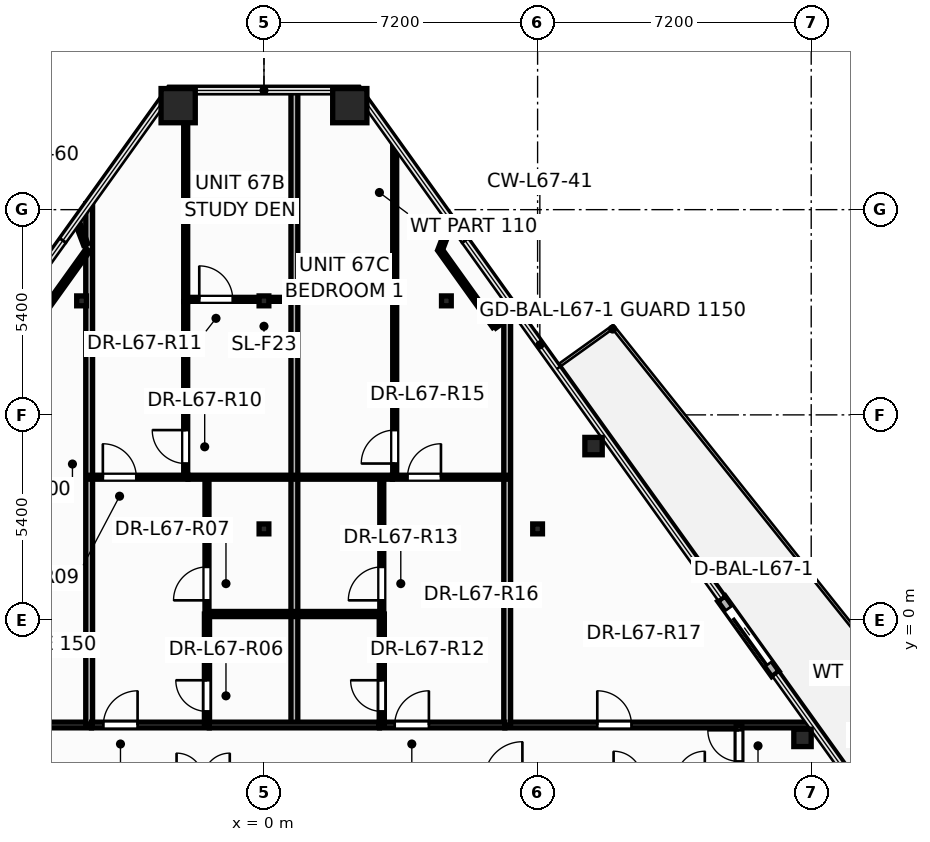
"""IFC4 building model, lengths in metres.
Left out: names, types, materials, properties, quantities, classifications, styles, units other than length and angle.
Written with IfcOpenShell. Run it as: python <this file> out.ifc"""

import sys

from ifc_helpers import new_model, si_unit, direction, frame, frame_2d, origin, origin_2d, place, context, subcontext, project, spatial, rectangle, hollow_rectangle, hollow_circle, i_section, extrude, element, fill, save


model = new_model("IFC4")
c1 = context("Model", 3, precision=1e-05, world=origin(), true_north=direction((0.0, 1.0)))
c2 = subcontext(c1, "Body", "Model", "MODEL_VIEW")
j1 = project(units=[si_unit("LENGTHUNIT", "METRE"), si_unit("PLANEANGLEUNIT", "RADIAN")], contexts=[c1])
p1 = place(None, origin())
s1 = spatial("IfcSite", under=j1, at=p1, CompositionType="ELEMENT")
p2 = place(p1, origin())
s2 = spatial("IfcBuilding", under=s1, at=p2, CompositionType="ELEMENT")
p3 = place(p2, frame((0.0, 0.0, 256.2)))
s3 = spatial("IfcBuildingStorey", under=s2, at=p3, CompositionType="ELEMENT", Elevation=256.2)
for number, where, z_axis, x_axis in (
    (1, (2.258, 13.537, 0.0), (0.0, 0.0, 1.0), (1.0, 0.0, 0.0)),
    (2, (-2.258, 13.537, 0.0), (0.0, 0.0, 1.0), (1.0, 0.0, 0.0)),
):
    element("IfcColumn", number, at=place(p3, frame(where, z_axis=z_axis, x_axis=x_axis)), inside=s3, PredefinedType="COLUMN", context=c2, shape_type="SweptSolid", body=[
        extrude(hollow_rectangle(XDim=0.9, YDim=0.9, WallThickness=0.04, at=origin_2d()), origin(), (0.0, 0.0, 1.0), 3.6),
    ])
for number, where, z_axis, x_axis in (
    (3, (14.171, -3.099, 0.0), (0.0, 0.0, 1.0), (1.0, 0.0, 0.0)),
    (4, (8.673, 4.579, 0.0), (0.0, 0.0, 1.0), (1.0, 0.0, 0.0)),
):
    element("IfcColumn", number, at=place(p3, frame(where, z_axis=z_axis, x_axis=x_axis)), inside=s3, PredefinedType="COLUMN", context=c2, shape_type="SweptSolid", body=[
        extrude(hollow_circle(Radius=0.229, WallThickness=0.016, at=origin_2d()), origin(), (0.0, 0.0, 1.0), 3.6),
    ])
for number, where, z_axis, x_axis in (
    (5, (0.0, 2.4, 0.0), (0.0, 0.0, 1.0), (1.0, 0.0, 0.0)),
    (6, (7.2, 2.4, 0.0), (0.0, 0.0, 1.0), (1.0, 0.0, 0.0)),
    (7, (-4.8, 8.4, 0.0), (0.0, 0.0, 1.0), (1.0, 0.0, 0.0)),
    (8, (0.0, 8.4, 0.0), (0.0, 0.0, 1.0), (1.0, 0.0, 0.0)),
    (9, (4.8, 8.4, 0.0), (0.0, 0.0, 1.0), (1.0, 0.0, 0.0)),
):
    element("IfcColumn", number, at=place(p3, frame(where, z_axis=z_axis, x_axis=x_axis)), inside=s3, PredefinedType="COLUMN", context=c2, shape_type="SweptSolid", body=[
        extrude(i_section(OverallWidth=0.256, OverallDepth=0.26, WebThickness=0.01, FlangeThickness=0.017, at=origin_2d()), origin(), (0.0, 0.0, 1.0), 3.6),
    ])
p4 = place(p3, frame((13.458, -1.417, -0.015), z_axis=(0.0, 0.0, 1.0), x_axis=(-0.582146480264, 0.813083928949, 0.0)))
e10 = element("IfcWall", 10, at=p4, inside=s3, PredefinedType="STANDARD", context=c2, shape_type="SweptSolid", body=[
    extrude(rectangle(XDim=2.44, YDim=0.24, at=frame_2d((1.22, 0.0))), origin(), (0.0, 0.0, 1.0), 2.878),
])
p5 = place(p4, frame((0.32, 0.0, 0.015)))
e11 = element("IfcOpeningElement", 11, at=p5, cuts=e10, PredefinedType="OPENING", context=c2, shape_type="SweptSolid", body=[
    extrude(rectangle(XDim=1.806, YDim=2.204, at=frame_2d((0.9, 1.102))), frame((0.0, 0.13, 0.0), z_axis=(0.0, -1.0, 0.0), x_axis=(1.0, 0.0, 0.0)), (0.0, 0.0, 1.0), 0.26),
])
p6 = place(p3, frame((-14.42, -2.76, 0.0), z_axis=(0.0, 0.0, 1.0), x_axis=(1.0, 0.0, 0.0)))
e12 = element("IfcWall", 12, at=p6, inside=s3, PredefinedType="PARTITIONING", context=c2, shape_type="SweptSolid", body=[
    extrude(rectangle(XDim=9.88, YDim=0.15, at=frame_2d((4.94, 0.0))), origin(), (0.0, 0.0, 1.0), 2.32),
])
p7 = place(p6, frame((3.555, 0.0, 0.0)))
e13 = element("IfcOpeningElement", 13, at=p7, cuts=e12, PredefinedType="OPENING", context=c2, shape_type="SweptSolid", body=[
    extrude(rectangle(XDim=0.906, YDim=2.104, at=frame_2d((0.45, 1.052))), frame((0.0, 0.085, 0.0), z_axis=(0.0, -1.0, 0.0), x_axis=(1.0, 0.0, 0.0)), (0.0, 0.0, 1.0), 0.17),
])
p8 = place(p3, frame((3.44, 3.76, 0.0), z_axis=(0.0, 0.0, 1.0), x_axis=(0.0, 1.0, 0.0)))
e14 = element("IfcWall", 14, at=p8, inside=s3, PredefinedType="PARTITIONING", context=c2, shape_type="SweptSolid", body=[
    extrude(rectangle(XDim=8.813, YDim=0.105, at=frame_2d((4.407, 0.0))), origin(), (0.0, 0.0, 1.0), 2.718),
])
p9 = place(p8, frame((0.36, 0.0, 0.0)))
e15 = element("IfcOpeningElement", 15, at=p9, cuts=e14, PredefinedType="OPENING", context=c2, shape_type="SweptSolid", body=[
    extrude(rectangle(XDim=0.886, YDim=2.104, at=frame_2d((0.44, 1.052))), frame((0.0, 0.062, 0.0), z_axis=(0.0, -1.0, 0.0), x_axis=(1.0, 0.0, 0.0)), (0.0, 0.0, 1.0), 0.125),
])
p10 = place(p3, frame((6.34, -2.76, 0.0), z_axis=(0.0, 0.0, 1.0), x_axis=(1.0, 0.0, 0.0)))
e16 = element("IfcWall", 16, at=p10, inside=s3, PredefinedType="PARTITIONING", context=c2, shape_type="SweptSolid", body=[
    extrude(rectangle(XDim=8.08, YDim=0.15, at=frame_2d((4.04, 0.0))), origin(), (0.0, 0.0, 1.0), 2.32),
])
p11 = place(p10, frame((2.431, 0.0, 0.0)))
e17 = element("IfcOpeningElement", 17, at=p11, cuts=e16, PredefinedType="OPENING", context=c2, shape_type="SweptSolid", body=[
    extrude(rectangle(XDim=0.906, YDim=2.104, at=frame_2d((0.45, 1.052))), frame((0.0, 0.085, 0.0), z_axis=(0.0, -1.0, 0.0), x_axis=(1.0, 0.0, 0.0)), (0.0, 0.0, 1.0), 0.17),
])
p12 = place(p3, frame((-4.6, -2.74, 0.0), z_axis=(0.0, 0.0, 1.0), x_axis=(0.0, 1.0, 0.0)))
e18 = element("IfcWall", 18, at=p12, inside=s3, PredefinedType="PARTITIONING", context=c2, shape_type="SweptSolid", body=[
    extrude(rectangle(XDim=13.693, YDim=0.18, at=frame_2d((6.847, 0.0))), origin(), (0.0, 0.0, 1.0), 2.32),
])
p13 = place(p3, frame((6.4, -2.76, 0.0), z_axis=(0.0, 0.0, 1.0), x_axis=(0.0, 1.0, 0.0)))
e19 = element("IfcWall", 19, at=p13, inside=s3, PredefinedType="PARTITIONING", context=c2, shape_type="SweptSolid", body=[
    extrude(rectangle(XDim=10.96, YDim=0.18, at=frame_2d((5.48, 0.0))), origin(), (0.0, 0.0, 1.0), 2.32),
])
p14 = place(p3, frame((-2.06, 8.38, 0.0), z_axis=(0.0, 0.0, 1.0), x_axis=(0.0, 1.0, 0.0)))
e20 = element("IfcWall", 20, at=p14, inside=s3, PredefinedType="PARTITIONING", context=c2, shape_type="SweptSolid", body=[
    extrude(rectangle(XDim=5.557, YDim=0.105, at=frame_2d((2.778, 0.0))), origin(), (0.0, 0.0, 1.0), 2.718),
])
p15 = place(p3, frame((0.8, -2.76, 0.0), z_axis=(0.0, 0.0, 1.0), x_axis=(0.0, 1.0, 0.0)))
e21 = element("IfcWall", 21, at=p15, inside=s3, PredefinedType="PARTITIONING", context=c2, shape_type="SweptSolid", body=[
    extrude(rectangle(XDim=16.697, YDim=0.18, at=frame_2d((8.348, 0.0))), origin(), (0.0, 0.0, 1.0), 2.32),
])
p16 = place(p3, frame((-2.06, 3.76, 0.0), z_axis=(0.0, 0.0, 1.0), x_axis=(0.0, 1.0, 0.0)))
e22 = element("IfcWall", 22, at=p16, inside=s3, PredefinedType="PARTITIONING", context=c2, shape_type="SweptSolid", body=[
    extrude(rectangle(XDim=4.618, YDim=0.105, at=frame_2d((2.309, 0.0))), origin(), (0.0, 0.0, 1.0), 2.718),
])
p17 = place(p16, frame((0.36, 0.0, 0.0)))
e23 = element("IfcOpeningElement", 23, at=p17, cuts=e22, PredefinedType="OPENING", context=c2, shape_type="SweptSolid", body=[
    extrude(rectangle(XDim=0.886, YDim=2.104, at=frame_2d((0.44, 1.052))), frame((0.0, 0.062, 0.0), z_axis=(0.0, -1.0, 0.0), x_axis=(1.0, 0.0, 0.0)), (0.0, 0.0, 1.0), 0.125),
])
p18 = place(p3, frame((-1.5, 0.16, 0.0), z_axis=(0.0, 0.0, 1.0), x_axis=(0.0, 1.0, 0.0)))
e24 = element("IfcWall", 24, at=p18, inside=s3, PredefinedType="PARTITIONING", context=c2, shape_type="SweptSolid", body=[
    extrude(rectangle(XDim=3.6, YDim=0.105, at=frame_2d((1.8, 0.0))), origin(), (0.0, 0.0, 1.0), 2.32),
])
p19 = place(p18, frame((0.36, 0.0, 0.0)))
e25 = element("IfcOpeningElement", 25, at=p19, cuts=e24, PredefinedType="OPENING", context=c2, shape_type="SweptSolid", body=[
    extrude(rectangle(XDim=0.886, YDim=2.104, at=frame_2d((0.44, 1.052))), frame((0.0, 0.062, 0.0), z_axis=(0.0, -1.0, 0.0), x_axis=(1.0, 0.0, 0.0)), (0.0, 0.0, 1.0), 0.125),
])
p20 = place(p3, frame((3.1, 0.16, 0.0), z_axis=(0.0, 0.0, 1.0), x_axis=(0.0, 1.0, 0.0)))
e26 = element("IfcWall", 26, at=p20, inside=s3, PredefinedType="PARTITIONING", context=c2, shape_type="SweptSolid", body=[
    extrude(rectangle(XDim=3.6, YDim=0.105, at=frame_2d((1.8, 0.0))), origin(), (0.0, 0.0, 1.0), 2.32),
])
p21 = place(p20, frame((0.36, 0.0, 0.0)))
e27 = element("IfcOpeningElement", 27, at=p21, cuts=e26, PredefinedType="OPENING", context=c2, shape_type="SweptSolid", body=[
    extrude(rectangle(XDim=0.886, YDim=2.104, at=frame_2d((0.44, 1.052))), frame((0.0, 0.062, 0.0), z_axis=(0.0, -1.0, 0.0), x_axis=(1.0, 0.0, 0.0)), (0.0, 0.0, 1.0), 0.125),
])
p22 = place(p3, frame((3.04, -2.76, 0.0), z_axis=(0.0, 0.0, 1.0), x_axis=(1.0, 0.0, 0.0)))
e28 = element("IfcWall", 28, at=p22, inside=s3, PredefinedType="PARTITIONING", context=c2, shape_type="SweptSolid", body=[
    extrude(rectangle(XDim=3.298, YDim=0.15, at=frame_2d((1.649, 0.0))), origin(), (0.0, 0.0, 1.0), 2.964),
])
p23 = place(p22, frame((0.4, 0.0, 0.0)))
e29 = element("IfcOpeningElement", 29, at=p23, cuts=e28, PredefinedType="OPENING", context=c2, shape_type="SweptSolid", body=[
    extrude(rectangle(XDim=0.906, YDim=2.104, at=frame_2d((0.45, 1.052))), frame((0.0, 0.085, 0.0), z_axis=(0.0, -1.0, 0.0), x_axis=(1.0, 0.0, 0.0)), (0.0, 0.0, 1.0), 0.17),
])
p24 = place(p3, frame((-4.538, -2.76, 0.0), z_axis=(0.0, 0.0, 1.0), x_axis=(1.0, 0.0, 0.0)))
e30 = element("IfcWall", 30, at=p24, inside=s3, PredefinedType="PARTITIONING", context=c2, shape_type="SweptSolid", body=[
    extrude(rectangle(XDim=3.098, YDim=0.15, at=frame_2d((1.549, 0.0))), origin(), (0.0, 0.0, 1.0), 2.964),
])
p25 = place(p24, frame((0.312, 0.0, 0.0)))
e31 = element("IfcOpeningElement", 31, at=p25, cuts=e30, PredefinedType="OPENING", context=c2, shape_type="SweptSolid", body=[
    extrude(rectangle(XDim=0.906, YDim=2.104, at=frame_2d((0.45, 1.052))), frame((0.0, 0.085, 0.0), z_axis=(0.0, -1.0, 0.0), x_axis=(1.0, 0.0, 0.0)), (0.0, 0.0, 1.0), 0.17),
])
p26 = place(p3, frame((3.38, 3.76, 0.0), z_axis=(0.0, 0.0, 1.0), x_axis=(1.0, 0.0, 0.0)))
e32 = element("IfcWall", 32, at=p26, inside=s3, PredefinedType="PARTITIONING", context=c2, shape_type="SweptSolid", body=[
    extrude(rectangle(XDim=3.02, YDim=0.105, at=frame_2d((1.51, 0.0))), origin(), (0.0, 0.0, 1.0), 3.345),
])
p27 = place(p26, frame((0.397, 0.0, 0.0)))
e33 = element("IfcOpeningElement", 33, at=p27, cuts=e32, PredefinedType="OPENING", context=c2, shape_type="SweptSolid", body=[
    extrude(rectangle(XDim=0.886, YDim=2.104, at=frame_2d((0.44, 1.052))), frame((0.0, 0.062, 0.0), z_axis=(0.0, -1.0, 0.0), x_axis=(1.0, 0.0, 0.0)), (0.0, 0.0, 1.0), 0.125),
])
p28 = place(p3, frame((-1.5, -2.76, 0.0), z_axis=(0.0, 0.0, 1.0), x_axis=(0.0, 1.0, 0.0)))
e34 = element("IfcWall", 34, at=p28, inside=s3, PredefinedType="PARTITIONING", context=c2, shape_type="SweptSolid", body=[
    extrude(rectangle(XDim=2.92, YDim=0.135, at=frame_2d((1.46, 0.0))), origin(), (0.0, 0.0, 1.0), 3.345),
])
p29 = place(p28, frame((0.357, 0.0, 0.0)))
e35 = element("IfcOpeningElement", 35, at=p29, cuts=e34, PredefinedType="OPENING", context=c2, shape_type="SweptSolid", body=[
    extrude(rectangle(XDim=0.826, YDim=2.104, at=frame_2d((0.41, 1.052))), frame((0.0, 0.078, 0.0), z_axis=(0.0, -1.0, 0.0), x_axis=(1.0, 0.0, 0.0)), (0.0, 0.0, 1.0), 0.155),
])
p30 = place(p3, frame((3.1, -2.76, 0.0), z_axis=(0.0, 0.0, 1.0), x_axis=(0.0, 1.0, 0.0)))
e36 = element("IfcWall", 36, at=p30, inside=s3, PredefinedType="PARTITIONING", context=c2, shape_type="SweptSolid", body=[
    extrude(rectangle(XDim=2.92, YDim=0.135, at=frame_2d((1.46, 0.0))), origin(), (0.0, 0.0, 1.0), 3.345),
])
p31 = place(p30, frame((0.357, 0.0, 0.0)))
e37 = element("IfcOpeningElement", 37, at=p31, cuts=e36, PredefinedType="OPENING", context=c2, shape_type="SweptSolid", body=[
    extrude(rectangle(XDim=0.826, YDim=2.104, at=frame_2d((0.41, 1.052))), frame((0.0, 0.078, 0.0), z_axis=(0.0, -1.0, 0.0), x_axis=(1.0, 0.0, 0.0)), (0.0, 0.0, 1.0), 0.155),
])
p32 = place(p3, frame((-2.06, 8.44, 0.0), z_axis=(0.0, 0.0, 1.0), x_axis=(1.0, 0.0, 0.0)))
e38 = element("IfcWall", 38, at=p32, inside=s3, PredefinedType="PARTITIONING", context=c2, shape_type="SweptSolid", body=[
    extrude(rectangle(XDim=2.86, YDim=0.105, at=frame_2d((1.43, 0.0))), origin(), (0.0, 0.0, 1.0), 2.32),
])
p33 = place(p32, frame((0.357, 0.0, 0.0)))
e39 = element("IfcOpeningElement", 39, at=p33, cuts=e38, PredefinedType="OPENING", context=c2, shape_type="SweptSolid", body=[
    extrude(rectangle(XDim=0.886, YDim=2.104, at=frame_2d((0.44, 1.052))), frame((0.0, 0.062, 0.0), z_axis=(0.0, -1.0, 0.0), x_axis=(1.0, 0.0, 0.0)), (0.0, 0.0, 1.0), 0.125),
])
p34 = place(p3, frame((-4.6, 3.76, 0.0), z_axis=(0.0, 0.0, 1.0), x_axis=(1.0, 0.0, 0.0)))
e40 = element("IfcWall", 40, at=p34, inside=s3, PredefinedType="PARTITIONING", context=c2, shape_type="SweptSolid", body=[
    extrude(rectangle(XDim=2.6, YDim=0.105, at=frame_2d((1.3, 0.0))), origin(), (0.0, 0.0, 1.0), 2.964),
])
p35 = place(p34, frame((0.36, 0.0, 0.0)))
e41 = element("IfcOpeningElement", 41, at=p35, cuts=e40, PredefinedType="OPENING", context=c2, shape_type="SweptSolid", body=[
    extrude(rectangle(XDim=0.886, YDim=2.104, at=frame_2d((0.44, 1.052))), frame((0.0, 0.062, 0.0), z_axis=(0.0, -1.0, 0.0), x_axis=(1.0, 0.0, 0.0)), (0.0, 0.0, 1.0), 0.125),
])
for number, where, z_axis, x_axis in (
    (42, (-4.635, 9.736, 0.0), (0.0, 0.0, 1.0), (-0.582, -0.813, 0.0)),
    (43, (6.068, 7.735, 0.0), (0.0, 0.0, 1.0), (-0.582, 0.813, 0.0)),
):
    element("IfcWall", number, at=place(p3, frame(where, z_axis=z_axis, x_axis=x_axis)), inside=s3, PredefinedType="PARTITIONING", context=c2, shape_type="SweptSolid", body=[
        extrude(rectangle(XDim=2.461, YDim=0.12, at=frame_2d((1.23, 0.0))), origin(), (0.0, 0.0, 1.0), 3.345),
    ])
p36 = place(p3, frame((-1.438, -2.76, 0.0), z_axis=(0.0, 0.0, 1.0), x_axis=(1.0, 0.0, 0.0)))
e44 = element("IfcWall", 44, at=p36, inside=s3, PredefinedType="PARTITIONING", context=c2, shape_type="SweptSolid", body=[
    extrude(rectangle(XDim=4.476, YDim=0.15, at=frame_2d((2.238, 0.0))), origin(), (0.0, 0.0, 1.0), 2.32),
])
p37 = place(p3, frame((-1.5, 0.16, 0.0), z_axis=(0.0, 0.0, 1.0), x_axis=(1.0, 0.0, 0.0)))
e45 = element("IfcWall", 45, at=p37, inside=s3, PredefinedType="PARTITIONING", context=c2, shape_type="SweptSolid", body=[
    extrude(rectangle(XDim=4.6, YDim=0.135, at=frame_2d((2.3, 0.0))), origin(), (0.0, 0.0, 1.0), 2.32),
])
p38 = place(p3, frame((-1.998, 3.76, 0.0), z_axis=(0.0, 0.0, 1.0), x_axis=(1.0, 0.0, 0.0)))
e46 = element("IfcWall", 46, at=p38, inside=s3, PredefinedType="PARTITIONING", context=c2, shape_type="SweptSolid", body=[
    extrude(rectangle(XDim=5.376, YDim=0.105, at=frame_2d((2.688, 0.0))), origin(), (0.0, 0.0, 1.0), 2.32),
])
p39 = place(p3, frame((12.5, -4.24, 0.0), z_axis=(0.0, 0.0, 1.0), x_axis=(0.0, 1.0, 0.0)))
e47 = element("IfcWall", 47, at=p39, inside=s3, PredefinedType="PARTITIONING", context=c2, shape_type="SweptSolid", body=[
    extrude(rectangle(XDim=1.48, YDim=0.15, at=frame_2d((0.74, 0.0))), origin(), (0.0, 0.0, 1.0), 2.32),
])
p40 = place(p39, frame((0.522, 0.0, 0.0)))
e48 = element("IfcOpeningElement", 48, at=p40, cuts=e47, PredefinedType="OPENING", context=c2, shape_type="SweptSolid", body=[
    extrude(rectangle(XDim=0.826, YDim=2.104, at=frame_2d((0.41, 1.052))), frame((0.0, 0.085, 0.0), z_axis=(0.0, -1.0, 0.0), x_axis=(1.0, 0.0, 0.0)), (0.0, 0.0, 1.0), 0.17),
])
p41 = place(p3, frame((-4.92, 10.489, 0.0), z_axis=(0.0, 0.0, 1.0), x_axis=(0.35415177854, -0.935187958518, 0.0)))
e49 = element("IfcWall", 49, at=p41, inside=s3, PredefinedType="PARTITIONING", context=c2, shape_type="SweptSolid", body=[
    extrude(rectangle(XDim=0.645, YDim=0.12, at=frame_2d((0.322, 0.0))), origin(), (0.0, 0.0, 1.0), 2.863),
])
p42 = place(p3, frame((4.635, 9.736, 0.0), z_axis=(0.0, 0.0, 1.0), x_axis=(0.353913607056, 0.935278118391, 0.0)))
e50 = element("IfcWall", 50, at=p42, inside=s3, PredefinedType="PARTITIONING", context=c2, shape_type="SweptSolid", body=[
    extrude(rectangle(XDim=0.805, YDim=0.12, at=frame_2d((0.402, 0.0))), origin(), (0.0, 0.0, 1.0), 2.863),
])
p43 = place(p3, frame((6.613, 8.125, 0.0), z_axis=(0.0, 0.0, 1.0), x_axis=(-0.812969505803, -0.582306261888, 0.0)))
e51 = element("IfcWall", 51, at=p43, inside=s3, PredefinedType="PARTITIONING", context=c2, shape_type="SweptSolid", body=[
    extrude(rectangle(XDim=0.67, YDim=0.12, at=frame_2d((0.335, 0.0))), origin(), (0.0, 0.0, 1.0), 2.863),
])
p44 = place(p5, origin())
e52 = element("IfcDoor", 52, at=p44, inside=s3, OperationType="SLIDING_TO_LEFT", PredefinedType="DOOR", context=c2, shape_type="SweptSolid", body=[
    extrude(rectangle(XDim=1.8, YDim=2.2, at=frame_2d((0.9, 1.1))), frame((0.0, 0.025, 0.0), z_axis=(0.0, -1.0, 0.0), x_axis=(1.0, 0.0, 0.0)), (0.0, 0.0, 1.0), 0.05),
])
fill(e11, e52)
p45 = place(p40, origin())
e53 = element("IfcDoor", 53, at=p45, inside=s3, OperationType="SINGLE_SWING_RIGHT", PredefinedType="DOOR", context=c2, shape_type="SweptSolid", body=[
    extrude(rectangle(XDim=0.82, YDim=2.1, at=frame_2d((0.41, 1.05))), frame((0.0, 0.025, 0.0), z_axis=(0.0, -1.0, 0.0), x_axis=(1.0, 0.0, 0.0)), (0.0, 0.0, 1.0), 0.05),
])
fill(e48, e53)
p46 = place(p29, origin())
e54 = element("IfcDoor", 54, at=p46, inside=s3, OperationType="SINGLE_SWING_RIGHT", PredefinedType="DOOR", context=c2, shape_type="SweptSolid", body=[
    extrude(rectangle(XDim=0.82, YDim=2.1, at=frame_2d((0.41, 1.05))), frame((0.0, 0.025, 0.0), z_axis=(0.0, -1.0, 0.0), x_axis=(1.0, 0.0, 0.0)), (0.0, 0.0, 1.0), 0.05),
])
fill(e35, e54)
p47 = place(p19, origin())
e55 = element("IfcDoor", 55, at=p47, inside=s3, OperationType="SINGLE_SWING_LEFT", PredefinedType="DOOR", context=c2, shape_type="SweptSolid", body=[
    extrude(rectangle(XDim=0.88, YDim=2.1, at=frame_2d((0.44, 1.05))), frame((0.0, 0.025, 0.0), z_axis=(0.0, -1.0, 0.0), x_axis=(1.0, 0.0, 0.0)), (0.0, 0.0, 1.0), 0.05),
])
fill(e25, e55)
p48 = place(p25, origin())
e56 = element("IfcDoor", 56, at=p48, inside=s3, OperationType="SINGLE_SWING_RIGHT", PredefinedType="DOOR", context=c2, shape_type="SweptSolid", body=[
    extrude(rectangle(XDim=0.9, YDim=2.1, at=frame_2d((0.45, 1.05))), frame((0.0, 0.025, 0.0), z_axis=(0.0, -1.0, 0.0), x_axis=(1.0, 0.0, 0.0)), (0.0, 0.0, 1.0), 0.05),
])
fill(e31, e56)
p49 = place(p35, origin())
e57 = element("IfcDoor", 57, at=p49, inside=s3, OperationType="SINGLE_SWING_LEFT", PredefinedType="DOOR", context=c2, shape_type="SweptSolid", body=[
    extrude(rectangle(XDim=0.88, YDim=2.1, at=frame_2d((0.44, 1.05))), frame((0.0, 0.025, 0.0), z_axis=(0.0, -1.0, 0.0), x_axis=(1.0, 0.0, 0.0)), (0.0, 0.0, 1.0), 0.05),
])
fill(e41, e57)
p50 = place(p17, origin())
e58 = element("IfcDoor", 58, at=p50, inside=s3, OperationType="SINGLE_SWING_RIGHT", PredefinedType="DOOR", context=c2, shape_type="SweptSolid", body=[
    extrude(rectangle(XDim=0.88, YDim=2.1, at=frame_2d((0.44, 1.05))), frame((0.0, 0.025, 0.0), z_axis=(0.0, -1.0, 0.0), x_axis=(1.0, 0.0, 0.0)), (0.0, 0.0, 1.0), 0.05),
])
fill(e23, e58)
p51 = place(p33, origin())
e59 = element("IfcDoor", 59, at=p51, inside=s3, OperationType="SINGLE_SWING_LEFT", PredefinedType="DOOR", context=c2, shape_type="SweptSolid", body=[
    extrude(rectangle(XDim=0.88, YDim=2.1, at=frame_2d((0.44, 1.05))), frame((0.0, 0.025, 0.0), z_axis=(0.0, -1.0, 0.0), x_axis=(1.0, 0.0, 0.0)), (0.0, 0.0, 1.0), 0.05),
])
fill(e39, e59)
p52 = place(p31, origin())
e60 = element("IfcDoor", 60, at=p52, inside=s3, OperationType="SINGLE_SWING_RIGHT", PredefinedType="DOOR", context=c2, shape_type="SweptSolid", body=[
    extrude(rectangle(XDim=0.82, YDim=2.1, at=frame_2d((0.41, 1.05))), frame((0.0, 0.025, 0.0), z_axis=(0.0, -1.0, 0.0), x_axis=(1.0, 0.0, 0.0)), (0.0, 0.0, 1.0), 0.05),
])
fill(e37, e60)
p53 = place(p21, origin())
e61 = element("IfcDoor", 61, at=p53, inside=s3, OperationType="SINGLE_SWING_LEFT", PredefinedType="DOOR", context=c2, shape_type="SweptSolid", body=[
    extrude(rectangle(XDim=0.88, YDim=2.1, at=frame_2d((0.44, 1.05))), frame((0.0, 0.025, 0.0), z_axis=(0.0, -1.0, 0.0), x_axis=(1.0, 0.0, 0.0)), (0.0, 0.0, 1.0), 0.05),
])
fill(e27, e61)
p54 = place(p23, origin())
e62 = element("IfcDoor", 62, at=p54, inside=s3, OperationType="SINGLE_SWING_RIGHT", PredefinedType="DOOR", context=c2, shape_type="SweptSolid", body=[
    extrude(rectangle(XDim=0.9, YDim=2.1, at=frame_2d((0.45, 1.05))), frame((0.0, 0.025, 0.0), z_axis=(0.0, -1.0, 0.0), x_axis=(1.0, 0.0, 0.0)), (0.0, 0.0, 1.0), 0.05),
])
fill(e29, e62)
p55 = place(p9, origin())
e63 = element("IfcDoor", 63, at=p55, inside=s3, OperationType="SINGLE_SWING_LEFT", PredefinedType="DOOR", context=c2, shape_type="SweptSolid", body=[
    extrude(rectangle(XDim=0.88, YDim=2.1, at=frame_2d((0.44, 1.05))), frame((0.0, 0.025, 0.0), z_axis=(0.0, -1.0, 0.0), x_axis=(1.0, 0.0, 0.0)), (0.0, 0.0, 1.0), 0.05),
])
fill(e15, e63)
p56 = place(p27, origin())
e64 = element("IfcDoor", 64, at=p56, inside=s3, OperationType="SINGLE_SWING_RIGHT", PredefinedType="DOOR", context=c2, shape_type="SweptSolid", body=[
    extrude(rectangle(XDim=0.88, YDim=2.1, at=frame_2d((0.44, 1.05))), frame((0.0, 0.025, 0.0), z_axis=(0.0, -1.0, 0.0), x_axis=(1.0, 0.0, 0.0)), (0.0, 0.0, 1.0), 0.05),
])
fill(e33, e64)
p57 = place(p11, origin())
e65 = element("IfcDoor", 65, at=p57, inside=s3, OperationType="SINGLE_SWING_LEFT", PredefinedType="DOOR", context=c2, shape_type="SweptSolid", body=[
    extrude(rectangle(XDim=0.9, YDim=2.1, at=frame_2d((0.45, 1.05))), frame((0.0, 0.025, 0.0), z_axis=(0.0, -1.0, 0.0), x_axis=(1.0, 0.0, 0.0)), (0.0, 0.0, 1.0), 0.05),
])
fill(e17, e65)
save(model, sys.argv[1])
